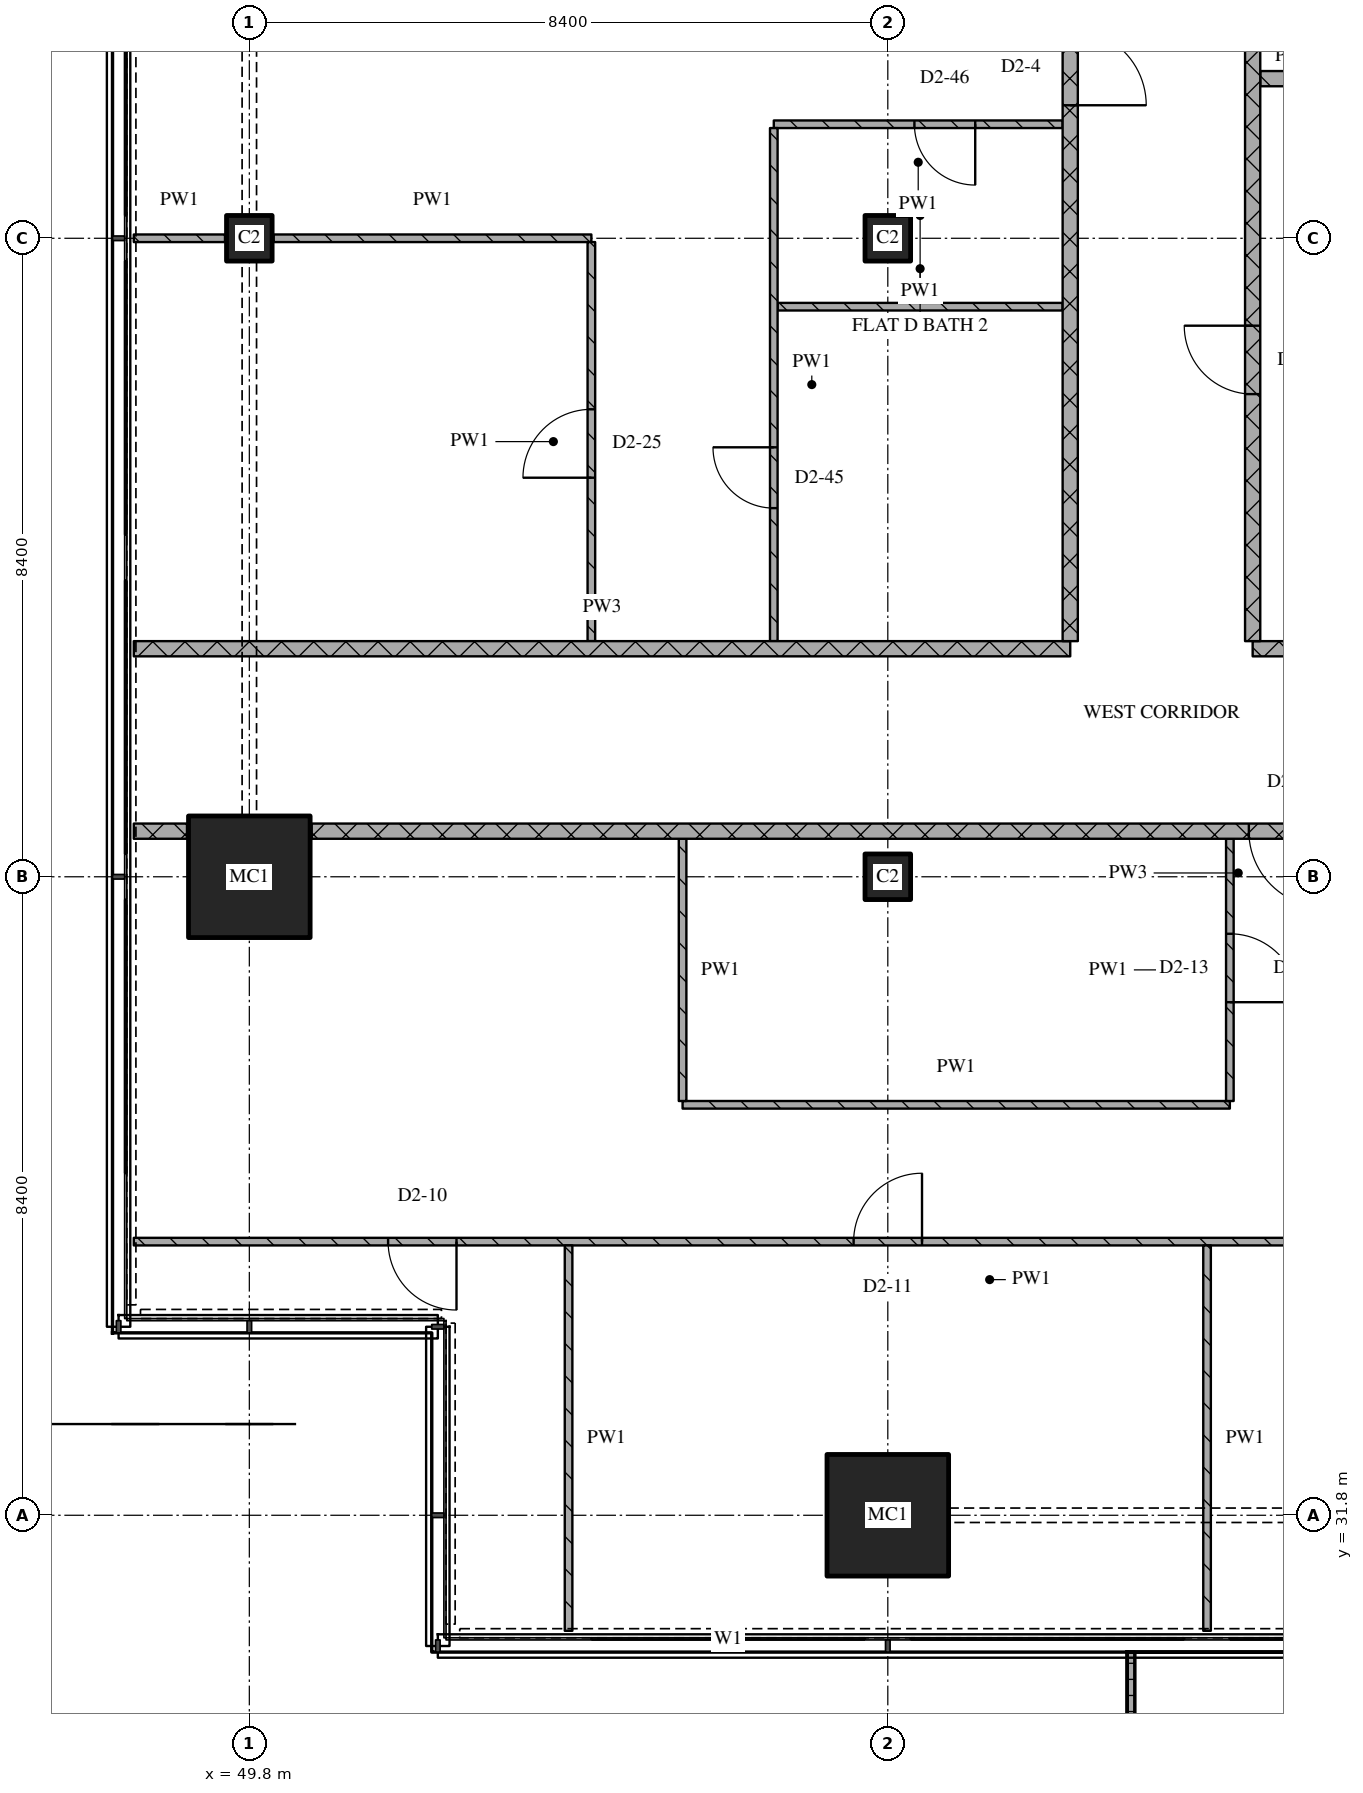
"""IFC4 building model, lengths in metres.
Left out: names, types, materials, properties, quantities, classifications, styles, units other than length and angle.
Written with IfcOpenShell. Run it as: python <this file> out.ifc"""

import sys

from ifc_helpers import new_model, si_unit, direction, frame, frame_2d, origin, origin_2d, place, context, subcontext, project, spatial, polyline, rectangle, outline, extrude, element, fill, save


model = new_model("IFC4")
c1 = context("Model", 3, precision=1e-05, world=origin(), true_north=direction((0.0, 1.0)))
c2 = subcontext(c1, "Body", "Model", "MODEL_VIEW")
j1 = project(units=[si_unit("LENGTHUNIT", "METRE"), si_unit("PLANEANGLEUNIT", "RADIAN")], contexts=[c1])
p1 = place(None, origin())
s1 = spatial("IfcSite", under=j1, at=p1, CompositionType="ELEMENT")
p2 = place(p1, origin())
s2 = spatial("IfcBuilding", under=s1, at=p2, CompositionType="ELEMENT")
p3 = place(p2, frame((0.0, 0.0, 223.5)))
s3 = spatial("IfcBuildingStorey", under=s2, at=p3, CompositionType="ELEMENT", Elevation=223.5)
p4 = place(p3, frame((49.8, 40.2, 0.0), z_axis=(0.0, 0.0, 1.0), x_axis=(1.0, 0.0, 0.0)))
e1 = element("IfcColumn", 1, at=p4, inside=s3, PredefinedType="COLUMN", context=c2, shape_type="SweptSolid", body=[
    extrude(rectangle(XDim=1.6, YDim=1.6, at=origin_2d()), origin(), (0.0, 0.0, 1.0), 3.6),
])
p5 = place(p3, frame((49.8, 48.6, 0.0), z_axis=(0.0, 0.0, 1.0), x_axis=(1.0, 0.0, 0.0)))
e2 = element("IfcColumn", 2, at=p5, inside=s3, PredefinedType="COLUMN", context=c2, shape_type="SweptSolid", body=[
    extrude(rectangle(XDim=0.6, YDim=0.6, at=origin_2d()), origin(), (0.0, 0.0, 1.0), 3.6),
])
p6 = place(p3, frame((58.2, 31.8, 0.0), z_axis=(0.0, 0.0, 1.0), x_axis=(1.0, 0.0, 0.0)))
e3 = element("IfcColumn", 3, at=p6, inside=s3, PredefinedType="COLUMN", context=c2, shape_type="SweptSolid", body=[
    extrude(rectangle(XDim=1.6, YDim=1.6, at=origin_2d()), origin(), (0.0, 0.0, 1.0), 3.6),
])
for number, where, z_axis, x_axis in (
    (4, (58.2, 40.2, 0.0), (0.0, 0.0, 1.0), (1.0, 0.0, 0.0)),
    (5, (58.2, 48.6, 0.0), (0.0, 0.0, 1.0), (1.0, 0.0, 0.0)),
):
    element("IfcColumn", number, at=place(p3, frame(where, z_axis=z_axis, x_axis=x_axis)), inside=s3, PredefinedType="COLUMN", context=c2, shape_type="SweptSolid", body=[
        extrude(rectangle(XDim=0.6, YDim=0.6, at=origin_2d()), origin(), (0.0, 0.0, 1.0), 3.6),
    ])
p7 = place(p3, origin())
e6 = element("IfcWall", 6, at=p7, inside=s3, PredefinedType="SOLIDWALL", context=c2, shape_type="SweptSolid", body=[
    extrude(outline(polyline([(61.35, 30.0), (61.45, 30.0), (61.45, 28.233), (67.55, 28.233), (67.55, 30.0), (67.65, 30.0), (67.65, 28.133), (61.35, 28.133), (61.35, 30.0)])), origin(), (0.0, 0.0, 1.0), 1.0),
])
p8 = place(p3, frame((70.8, 35.4, 0.0), z_axis=(0.0, 0.0, 1.0), x_axis=(-1.0, 0.0, 0.0)))
e7 = element("IfcWall", 7, at=p8, inside=s3, PredefinedType="PARTITIONING", context=c2, shape_type="SweptSolid", body=[
    extrude(rectangle(XDim=22.52, YDim=0.1, at=frame_2d((11.26, 0.0))), origin(), (0.0, 0.0, 1.0), 3.32),
])
p9 = place(p8, frame((12.15, 0.0, 0.0)))
e8 = element("IfcOpeningElement", 8, at=p9, cuts=e7, PredefinedType="OPENING", context=c2, shape_type="SweptSolid", body=[
    extrude(rectangle(XDim=0.9, YDim=2.1, at=frame_2d((0.45, 1.05))), frame((0.0, 0.06, 0.0), z_axis=(0.0, -1.0, 0.0), x_axis=(1.0, 0.0, 0.0)), (0.0, 0.0, 1.0), 0.12),
])
p10 = place(p8, frame((18.274, 0.0, 0.0)))
e9 = element("IfcOpeningElement", 9, at=p10, cuts=e7, PredefinedType="OPENING", context=c2, shape_type="SweptSolid", body=[
    extrude(rectangle(XDim=0.9, YDim=2.1, at=frame_2d((0.45, 1.05))), frame((0.0, 0.06, 0.0), z_axis=(0.0, -1.0, 0.0), x_axis=(1.0, 0.0, 0.0)), (0.0, 0.0, 1.0), 0.12),
])
p11 = place(p3, frame((55.5, 37.2, 0.0), z_axis=(0.0, 0.0, 1.0), x_axis=(1.0, 0.0, 0.0)))
e10 = element("IfcWall", 10, at=p11, inside=s3, PredefinedType="PARTITIONING", context=c2, shape_type="SweptSolid", body=[
    extrude(rectangle(XDim=7.2, YDim=0.1, at=frame_2d((3.6, 0.0))), origin(), (0.0, 0.0, 1.0), 3.32),
])
p12 = place(p3, frame((48.28, 40.8, 0.0), z_axis=(0.0, 0.0, 1.0), x_axis=(1.0, 0.0, 0.0)))
e11 = element("IfcWall", 11, at=p12, inside=s3, PredefinedType="PARTITIONING", context=c2, shape_type="SweptSolid", body=[
    extrude(rectangle(XDim=0.7, YDim=0.2, at=frame_2d((0.35, 0.0))), origin(), (0.0, 0.0, 1.0), 3.32),
])
p13 = place(p3, frame((75.0, 40.8, 0.0), z_axis=(0.0, 0.0, 1.0), x_axis=(-1.0, 0.0, 0.0)))
e12 = element("IfcWall", 12, at=p13, inside=s3, PredefinedType="PARTITIONING", context=c2, shape_type="SweptSolid", body=[
    extrude(rectangle(XDim=24.38, YDim=0.2, at=frame_2d((12.19, 0.0))), origin(), (0.0, 0.0, 1.0), 3.32),
])
p14 = place(p13, frame((11.05, 0.0, 0.0)))
e13 = element("IfcOpeningElement", 13, at=p14, cuts=e12, PredefinedType="OPENING", context=c2, shape_type="SweptSolid", body=[
    extrude(rectangle(XDim=1.0, YDim=2.1, at=frame_2d((0.5, 1.05))), frame((0.0, 0.11, 0.0), z_axis=(0.0, -1.0, 0.0), x_axis=(1.0, 0.0, 0.0)), (0.0, 0.0, 1.0), 0.22),
])
p15 = place(p3, frame((48.28, 43.2, 0.0), z_axis=(0.0, 0.0, 1.0), x_axis=(1.0, 0.0, 0.0)))
e14 = element("IfcWall", 14, at=p15, inside=s3, PredefinedType="PARTITIONING", context=c2, shape_type="SweptSolid", body=[
    extrude(rectangle(XDim=12.32, YDim=0.2, at=frame_2d((6.16, 0.0))), origin(), (0.0, 0.0, 1.0), 3.32),
])
p16 = place(p3, frame((63.0, 43.2, 0.0), z_axis=(0.0, 0.0, 1.0), x_axis=(1.0, 0.0, 0.0)))
e15 = element("IfcWall", 15, at=p16, inside=s3, PredefinedType="PARTITIONING", context=c2, shape_type="SweptSolid", body=[
    extrude(rectangle(XDim=5.2, YDim=0.2, at=frame_2d((2.6, 0.0))), origin(), (0.0, 0.0, 1.0), 3.32),
])
p17 = place(p3, frame((56.75, 47.7, 0.0), z_axis=(0.0, 0.0, 1.0), x_axis=(1.0, 0.0, 0.0)))
e16 = element("IfcWall", 16, at=p17, inside=s3, PredefinedType="PARTITIONING", context=c2, shape_type="SweptSolid", body=[
    extrude(rectangle(XDim=3.75, YDim=0.1, at=frame_2d((1.875, 0.0))), origin(), (0.0, 0.0, 1.0), 3.32),
])
p18 = place(p3, frame((48.28, 48.6, 0.0), z_axis=(0.0, 0.0, 1.0), x_axis=(1.0, 0.0, 0.0)))
e17 = element("IfcWall", 17, at=p18, inside=s3, PredefinedType="PARTITIONING", context=c2, shape_type="SweptSolid", body=[
    extrude(rectangle(XDim=1.2, YDim=0.1, at=frame_2d((0.6, 0.0))), origin(), (0.0, 0.0, 1.0), 3.32),
])
p19 = place(p3, frame((50.12, 48.6, 0.0), z_axis=(0.0, 0.0, 1.0), x_axis=(1.0, 0.0, 0.0)))
e18 = element("IfcWall", 18, at=p19, inside=s3, PredefinedType="PARTITIONING", context=c2, shape_type="SweptSolid", body=[
    extrude(rectangle(XDim=4.18, YDim=0.1, at=frame_2d((2.09, 0.0))), origin(), (0.0, 0.0, 1.0), 3.32),
])
p20 = place(p3, frame((60.5, 50.1, 0.0), z_axis=(0.0, 0.0, 1.0), x_axis=(-1.0, 0.0, 0.0)))
e19 = element("IfcWall", 19, at=p20, inside=s3, PredefinedType="PARTITIONING", context=c2, shape_type="SweptSolid", body=[
    extrude(rectangle(XDim=3.8, YDim=0.1, at=frame_2d((1.9, 0.0))), origin(), (0.0, 0.0, 1.0), 3.32),
])
p21 = place(p20, frame((1.15, 0.0, 0.0)))
e20 = element("IfcOpeningElement", 20, at=p21, cuts=e19, PredefinedType="OPENING", context=c2, shape_type="SweptSolid", body=[
    extrude(rectangle(XDim=0.8, YDim=2.1, at=frame_2d((0.4, 1.05))), frame((0.0, 0.06, 0.0), z_axis=(0.0, -1.0, 0.0), x_axis=(1.0, 0.0, 0.0)), (0.0, 0.0, 1.0), 0.12),
])
p22 = place(p3, frame((63.1, 50.7, 0.0), z_axis=(0.0, 0.0, 1.0), x_axis=(1.0, 0.0, 0.0)))
e21 = element("IfcWall", 21, at=p22, inside=s3, PredefinedType="PARTITIONING", context=c2, shape_type="SweptSolid", body=[
    extrude(rectangle(XDim=5.1, YDim=0.2, at=frame_2d((2.55, 0.0))), origin(), (0.0, 0.0, 1.0), 3.32),
])
p23 = place(p3, frame((54.0, 35.35, 0.0), z_axis=(0.0, 0.0, 1.0), x_axis=(0.0, -1.0, 0.0)))
e22 = element("IfcWall", 22, at=p23, inside=s3, PredefinedType="PARTITIONING", context=c2, shape_type="SweptSolid", body=[
    extrude(rectangle(XDim=5.07, YDim=0.1, at=frame_2d((2.535, 0.0))), origin(), (0.0, 0.0, 1.0), 3.32),
])
p24 = place(p3, frame((54.3, 43.3, 0.0), z_axis=(0.0, 0.0, 1.0), x_axis=(0.0, 1.0, 0.0)))
e23 = element("IfcWall", 23, at=p24, inside=s3, PredefinedType="PARTITIONING", context=c2, shape_type="SweptSolid", body=[
    extrude(rectangle(XDim=5.25, YDim=0.1, at=frame_2d((2.625, 0.0))), origin(), (0.0, 0.0, 1.0), 3.32),
])
p25 = place(p24, frame((2.15, 0.0, 0.0)))
e24 = element("IfcOpeningElement", 24, at=p25, cuts=e23, PredefinedType="OPENING", context=c2, shape_type="SweptSolid", body=[
    extrude(rectangle(XDim=0.9, YDim=2.1, at=frame_2d((0.45, 1.05))), frame((0.0, 0.06, 0.0), z_axis=(0.0, -1.0, 0.0), x_axis=(1.0, 0.0, 0.0)), (0.0, 0.0, 1.0), 0.12),
])
p26 = place(p3, frame((55.5, 40.7, 0.0), z_axis=(0.0, 0.0, 1.0), x_axis=(0.0, -1.0, 0.0)))
e25 = element("IfcWall", 25, at=p26, inside=s3, PredefinedType="PARTITIONING", context=c2, shape_type="SweptSolid", body=[
    extrude(rectangle(XDim=3.45, YDim=0.1, at=frame_2d((1.725, 0.0))), origin(), (0.0, 0.0, 1.0), 3.32),
])
p27 = place(p3, frame((56.7, 50.05, 0.0), z_axis=(0.0, 0.0, 1.0), x_axis=(0.0, -1.0, 0.0)))
e26 = element("IfcWall", 26, at=p27, inside=s3, PredefinedType="PARTITIONING", context=c2, shape_type="SweptSolid", body=[
    extrude(rectangle(XDim=6.75, YDim=0.1, at=frame_2d((3.375, 0.0))), origin(), (0.0, 0.0, 1.0), 3.32),
])
p28 = place(p27, frame((4.2, 0.0, 0.0)))
e27 = element("IfcOpeningElement", 27, at=p28, cuts=e26, PredefinedType="OPENING", context=c2, shape_type="SweptSolid", body=[
    extrude(rectangle(XDim=0.8, YDim=2.1, at=frame_2d((0.4, 1.05))), frame((0.0, 0.06, 0.0), z_axis=(0.0, -1.0, 0.0), x_axis=(1.0, 0.0, 0.0)), (0.0, 0.0, 1.0), 0.12),
])
p29 = place(p3, frame((60.6, 43.3, 0.0), z_axis=(0.0, 0.0, 1.0), x_axis=(0.0, 1.0, 0.0)))
e28 = element("IfcWall", 28, at=p29, inside=s3, PredefinedType="PARTITIONING", context=c2, shape_type="SweptSolid", body=[
    extrude(rectangle(XDim=17.8, YDim=0.2, at=frame_2d((8.9, 0.0))), origin(), (0.0, 0.0, 1.0), 3.32),
])
p30 = place(p29, frame((7.05, 0.0, 0.0)))
e29 = element("IfcOpeningElement", 29, at=p30, cuts=e28, PredefinedType="OPENING", context=c2, shape_type="SweptSolid", body=[
    extrude(rectangle(XDim=1.0, YDim=2.1, at=frame_2d((0.5, 1.05))), frame((0.0, 0.11, 0.0), z_axis=(0.0, -1.0, 0.0), x_axis=(1.0, 0.0, 0.0)), (0.0, 0.0, 1.0), 0.22),
])
p31 = place(p3, frame((62.4, 35.35, 0.0), z_axis=(0.0, 0.0, 1.0), x_axis=(0.0, -1.0, 0.0)))
e30 = element("IfcWall", 30, at=p31, inside=s3, PredefinedType="PARTITIONING", context=c2, shape_type="SweptSolid", body=[
    extrude(rectangle(XDim=5.07, YDim=0.1, at=frame_2d((2.535, 0.0))), origin(), (0.0, 0.0, 1.0), 3.32),
])
p32 = place(p3, frame((62.7, 37.25, 0.0), z_axis=(0.0, 0.0, 1.0), x_axis=(0.0, 1.0, 0.0)))
e31 = element("IfcWall", 31, at=p32, inside=s3, PredefinedType="PARTITIONING", context=c2, shape_type="SweptSolid", body=[
    extrude(rectangle(XDim=3.45, YDim=0.1, at=frame_2d((1.725, 0.0))), origin(), (0.0, 0.0, 1.0), 3.32),
])
p33 = place(p32, frame((1.3, 0.0, 0.0)))
e32 = element("IfcOpeningElement", 32, at=p33, cuts=e31, PredefinedType="OPENING", context=c2, shape_type="SweptSolid", body=[
    extrude(rectangle(XDim=0.9, YDim=2.1, at=frame_2d((0.45, 1.05))), frame((0.0, 0.06, 0.0), z_axis=(0.0, -1.0, 0.0), x_axis=(1.0, 0.0, 0.0)), (0.0, 0.0, 1.0), 0.12),
])
p34 = place(p3, frame((63.0, 58.7, 0.0), z_axis=(0.0, 0.0, 1.0), x_axis=(0.0, -1.0, 0.0)))
e33 = element("IfcWall", 33, at=p34, inside=s3, PredefinedType="PARTITIONING", context=c2, shape_type="SweptSolid", body=[
    extrude(rectangle(XDim=15.4, YDim=0.2, at=frame_2d((7.7, 0.0))), origin(), (0.0, 0.0, 1.0), 3.32),
])
p35 = place(p34, frame((3.45, 0.0, 0.0)))
e34 = element("IfcOpeningElement", 34, at=p35, cuts=e33, PredefinedType="OPENING", context=c2, shape_type="SweptSolid", body=[
    extrude(rectangle(XDim=1.0, YDim=2.1, at=frame_2d((0.5, 1.05))), frame((0.0, 0.11, 0.0), z_axis=(0.0, -1.0, 0.0), x_axis=(1.0, 0.0, 0.0)), (0.0, 0.0, 1.0), 0.22),
])
p36 = place(p34, frame((11.25, 0.0, 0.0)))
e35 = element("IfcOpeningElement", 35, at=p36, cuts=e33, PredefinedType="OPENING", context=c2, shape_type="SweptSolid", body=[
    extrude(rectangle(XDim=0.9, YDim=2.1, at=frame_2d((0.45, 1.05))), frame((0.0, 0.11, 0.0), z_axis=(0.0, -1.0, 0.0), x_axis=(1.0, 0.0, 0.0)), (0.0, 0.0, 1.0), 0.22),
])
p37 = place(p9, origin())
e36 = element("IfcDoor", 36, at=p37, inside=s3, OperationType="SINGLE_SWING_RIGHT", PredefinedType="DOOR", context=c2, shape_type="SweptSolid", body=[
    extrude(rectangle(XDim=0.9, YDim=2.1, at=frame_2d((0.45, 1.05))), frame((0.0, 0.025, 0.0), z_axis=(0.0, -1.0, 0.0), x_axis=(1.0, 0.0, 0.0)), (0.0, 0.0, 1.0), 0.05),
])
fill(e8, e36)
p38 = place(p10, origin())
e37 = element("IfcDoor", 37, at=p38, inside=s3, OperationType="SINGLE_SWING_LEFT", PredefinedType="DOOR", context=c2, shape_type="SweptSolid", body=[
    extrude(rectangle(XDim=0.9, YDim=2.1, at=frame_2d((0.45, 1.05))), frame((0.0, 0.025, 0.0), z_axis=(0.0, -1.0, 0.0), x_axis=(1.0, 0.0, 0.0)), (0.0, 0.0, 1.0), 0.05),
])
fill(e9, e37)
p39 = place(p14, origin())
e38 = element("IfcDoor", 38, at=p39, inside=s3, OperationType="SINGLE_SWING_LEFT", PredefinedType="DOOR", context=c2, shape_type="SweptSolid", body=[
    extrude(rectangle(XDim=1.0, YDim=2.1, at=frame_2d((0.5, 1.05))), frame((0.0, 0.025, 0.0), z_axis=(0.0, -1.0, 0.0), x_axis=(1.0, 0.0, 0.0)), (0.0, 0.0, 1.0), 0.05),
])
fill(e13, e38)
p40 = place(p21, origin())
e39 = element("IfcDoor", 39, at=p40, inside=s3, OperationType="SINGLE_SWING_LEFT", PredefinedType="DOOR", context=c2, shape_type="SweptSolid", body=[
    extrude(rectangle(XDim=0.8, YDim=2.1, at=frame_2d((0.4, 1.05))), frame((0.0, 0.025, 0.0), z_axis=(0.0, -1.0, 0.0), x_axis=(1.0, 0.0, 0.0)), (0.0, 0.0, 1.0), 0.05),
])
fill(e20, e39)
p41 = place(p25, origin())
e40 = element("IfcDoor", 40, at=p41, inside=s3, OperationType="SINGLE_SWING_LEFT", PredefinedType="DOOR", context=c2, shape_type="SweptSolid", body=[
    extrude(rectangle(XDim=0.9, YDim=2.1, at=frame_2d((0.45, 1.05))), frame((0.0, 0.025, 0.0), z_axis=(0.0, -1.0, 0.0), x_axis=(1.0, 0.0, 0.0)), (0.0, 0.0, 1.0), 0.05),
])
fill(e24, e40)
p42 = place(p28, origin())
e41 = element("IfcDoor", 41, at=p42, inside=s3, OperationType="SINGLE_SWING_RIGHT", PredefinedType="DOOR", context=c2, shape_type="SweptSolid", body=[
    extrude(rectangle(XDim=0.8, YDim=2.1, at=frame_2d((0.4, 1.05))), frame((0.0, 0.025, 0.0), z_axis=(0.0, -1.0, 0.0), x_axis=(1.0, 0.0, 0.0)), (0.0, 0.0, 1.0), 0.05),
])
fill(e27, e41)
p43 = place(p30, origin())
e42 = element("IfcDoor", 42, at=p43, inside=s3, OperationType="SINGLE_SWING_RIGHT", PredefinedType="DOOR", context=c2, shape_type="SweptSolid", body=[
    extrude(rectangle(XDim=1.0, YDim=2.1, at=frame_2d((0.5, 1.05))), frame((0.0, 0.025, 0.0), z_axis=(0.0, -1.0, 0.0), x_axis=(1.0, 0.0, 0.0)), (0.0, 0.0, 1.0), 0.05),
])
fill(e29, e42)
p44 = place(p33, origin())
e43 = element("IfcDoor", 43, at=p44, inside=s3, OperationType="SINGLE_SWING_RIGHT", PredefinedType="DOOR", context=c2, shape_type="SweptSolid", body=[
    extrude(rectangle(XDim=0.9, YDim=2.1, at=frame_2d((0.45, 1.05))), frame((0.0, 0.025, 0.0), z_axis=(0.0, -1.0, 0.0), x_axis=(1.0, 0.0, 0.0)), (0.0, 0.0, 1.0), 0.05),
])
fill(e32, e43)
p45 = place(p36, origin())
e44 = element("IfcDoor", 44, at=p45, inside=s3, OperationType="SINGLE_SWING_RIGHT", PredefinedType="DOOR", context=c2, shape_type="SweptSolid", body=[
    extrude(rectangle(XDim=0.9, YDim=2.1, at=frame_2d((0.45, 1.05))), frame((0.0, 0.025, 0.0), z_axis=(0.0, -1.0, 0.0), x_axis=(1.0, 0.0, 0.0)), (0.0, 0.0, 1.0), 0.05),
])
fill(e35, e44)
save(model, sys.argv[1])
